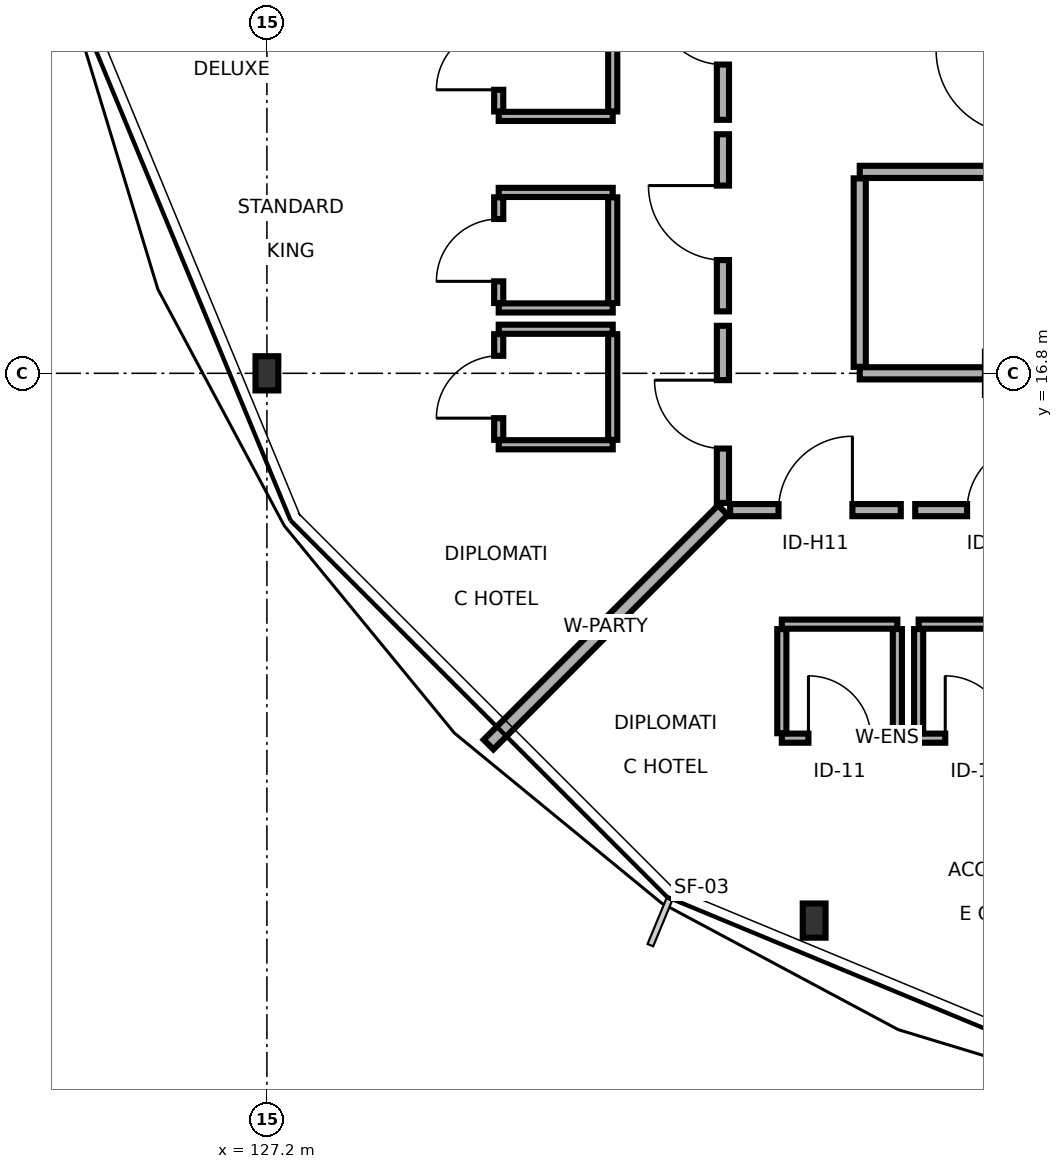
"""IFC4 building model, lengths in metres.
Left out: names, types, materials, properties, quantities, classifications, styles, units other than length and angle.
Written with IfcOpenShell. Run it as: python <this file> out.ifc"""

import sys

from ifc_helpers import new_model, si_unit, direction, frame, frame_2d, origin, origin_2d, place, context, subcontext, project, spatial, rectangle, i_section, extrude, element, fill, save


model = new_model("IFC4")
c1 = context("Model", 3, precision=1e-05, world=origin(), true_north=direction((0.0, 1.0)))
c2 = subcontext(c1, "Body", "Model", "MODEL_VIEW")
j1 = project(units=[si_unit("LENGTHUNIT", "METRE"), si_unit("PLANEANGLEUNIT", "RADIAN")], contexts=[c1])
p1 = place(None, origin())
s1 = spatial("IfcSite", under=j1, at=p1, CompositionType="ELEMENT")
p2 = place(p1, origin())
s2 = spatial("IfcBuilding", under=s1, at=p2, CompositionType="ELEMENT")
p3 = place(p2, frame((0.0, 0.0, 31.7)))
s3 = spatial("IfcBuildingStorey", under=s2, at=p3, CompositionType="ELEMENT", Elevation=31.7)
for number, where, z_axis, x_axis in (
    (1, (134.4, 9.6, 0.0), (0.0, 0.0, 1.0), (1.0, 0.0, 0.0)),
    (2, (127.2, 16.8, 0.0), (0.0, 0.0, 1.0), (1.0, 0.0, 0.0)),
):
    element("IfcColumn", number, at=place(p3, frame(where, z_axis=z_axis, x_axis=x_axis)), inside=s3, PredefinedType="COLUMN", context=c2, shape_type="SweptSolid", body=[
        extrude(i_section(OverallWidth=0.3, OverallDepth=0.45, WebThickness=0.014, FlangeThickness=0.026, FilletRadius=0.027, at=origin_2d()), origin(), (0.0, 0.0, 1.0), 3.4),
    ])
p4 = place(p3, frame((135.0, 16.8, 0.0), z_axis=(0.0, 0.0, 1.0), x_axis=(1.0, 0.0, 0.0)))
e3 = element("IfcWall", 3, at=p4, inside=s3, PredefinedType="PARTITIONING", context=c2, shape_type="SweptSolid", body=[
    extrude(rectangle(XDim=5.4, YDim=0.16, at=frame_2d((2.7, 0.0))), origin(), (0.0, 0.0, 1.0), 2.705),
])
p5 = place(p4, frame((3.94, 0.0, 0.0)))
e4 = element("IfcOpeningElement", 4, at=p5, cuts=e3, PredefinedType="OPENING", context=c2, shape_type="SweptSolid", body=[
    extrude(rectangle(XDim=1.3, YDim=2.2, at=frame_2d((0.65, 1.1))), frame((0.0, 0.09, 0.0), z_axis=(0.0, -1.0, 0.0), x_axis=(1.0, 0.0, 0.0)), (0.0, 0.0, 1.0), 0.18),
])
p6 = place(p3, frame((135.0, 16.885, 0.0), z_axis=(0.0, 0.0, 1.0), x_axis=(0.0, 1.0, 0.0)))
e5 = element("IfcWall", 5, at=p6, inside=s3, PredefinedType="PARTITIONING", context=c2, shape_type="SweptSolid", body=[
    extrude(rectangle(XDim=2.48, YDim=0.16, at=frame_2d((1.24, 0.0))), origin(), (0.0, 0.0, 1.0), 2.755),
])
p7 = place(p3, frame((135.0, 19.45, 0.0), z_axis=(0.0, 0.0, 1.0), x_axis=(1.0, 0.0, 0.0)))
e6 = element("IfcWall", 6, at=p7, inside=s3, PredefinedType="PARTITIONING", context=c2, shape_type="SweptSolid", body=[
    extrude(rectangle(XDim=2.2, YDim=0.16, at=frame_2d((1.1, 0.0))), origin(), (0.0, 0.0, 1.0), 2.705),
])
p8 = place(p3, frame((133.295, 15.0, 0.0), z_axis=(0.0, 0.0, 1.0), x_axis=(1.0, 0.0, 0.0)))
e7 = element("IfcWall", 7, at=p8, inside=s3, PredefinedType="PARTITIONING", context=c2, shape_type="SweptSolid", body=[
    extrude(rectangle(XDim=2.245, YDim=0.16, at=frame_2d((1.123, 0.0))), origin(), (0.0, 0.0, 1.0), 3.17),
])
p9 = place(p8, frame((0.636, 0.0, 0.0)))
e8 = element("IfcOpeningElement", 8, at=p9, cuts=e7, PredefinedType="OPENING", context=c2, shape_type="SweptSolid", body=[
    extrude(rectangle(XDim=0.972, YDim=2.16, at=frame_2d((0.486, 1.08))), frame((0.0, 0.09, 0.0), z_axis=(0.0, -1.0, 0.0), x_axis=(1.0, 0.0, 0.0)), (0.0, 0.0, 1.0), 0.18),
])
p10 = place(p3, frame((133.975, 12.0, 0.0), z_axis=(0.0, 0.0, 1.0), x_axis=(1.0, 0.0, 0.0)))
e9 = element("IfcWall", 9, at=p10, inside=s3, PredefinedType="PARTITIONING", context=c2, shape_type="SweptSolid", body=[
    extrude(rectangle(XDim=1.52, YDim=0.12, at=frame_2d((0.76, 0.0))), origin(), (0.0, 0.0, 1.0), 2.755),
])
p11 = place(p10, frame((0.35, 0.0, 0.0)))
e10 = element("IfcOpeningElement", 10, at=p11, cuts=e9, PredefinedType="OPENING", context=c2, shape_type="SweptSolid", body=[
    extrude(rectangle(XDim=0.82, YDim=2.08, at=frame_2d((0.41, 1.04))), frame((0.0, 0.07, 0.0), z_axis=(0.0, -1.0, 0.0), x_axis=(1.0, 0.0, 0.0)), (0.0, 0.0, 1.0), 0.14),
])
p12 = place(p3, frame((133.975, 13.5, 0.0), z_axis=(0.0, 0.0, 1.0), x_axis=(1.0, 0.0, 0.0)))
e11 = element("IfcWall", 11, at=p12, inside=s3, PredefinedType="PARTITIONING", context=c2, shape_type="SweptSolid", body=[
    extrude(rectangle(XDim=1.52, YDim=0.12, at=frame_2d((0.76, 0.0))), origin(), (0.0, 0.0, 1.0), 3.17),
])
p13 = place(p3, frame((133.975, 12.065, 0.0), z_axis=(0.0, 0.0, 1.0), x_axis=(0.0, 1.0, 0.0)))
e12 = element("IfcWall", 12, at=p13, inside=s3, PredefinedType="PARTITIONING", context=c2, shape_type="SweptSolid", body=[
    extrude(rectangle(XDim=1.37, YDim=0.12, at=frame_2d((0.685, 0.0))), origin(), (0.0, 0.0, 1.0), 3.17),
])
p14 = place(p3, frame((135.495, 12.065, 0.0), z_axis=(0.0, 0.0, 1.0), x_axis=(0.0, 1.0, 0.0)))
e13 = element("IfcWall", 13, at=p14, inside=s3, PredefinedType="PARTITIONING", context=c2, shape_type="SweptSolid", body=[
    extrude(rectangle(XDim=1.37, YDim=0.12, at=frame_2d((0.685, 0.0))), origin(), (0.0, 0.0, 1.0), 2.755),
])
p15 = place(p3, frame((133.2, 15.0, 0.0), z_axis=(0.0, 0.0, 1.0), x_axis=(-0.707078790814, -0.707134770451, 0.0)))
e14 = element("IfcWall", 14, at=p15, inside=s3, PredefinedType="PARTITIONING", context=c2, shape_type="SweptSolid", body=[
    extrude(rectangle(XDim=4.361, YDim=0.18, at=frame_2d((2.181, 0.0))), origin(), (0.0, 0.0, 1.0), 2.655),
])
p16 = place(p3, frame((135.73, 15.0, 0.0), z_axis=(0.0, 0.0, 1.0), x_axis=(1.0, 0.0, 0.0)))
e15 = element("IfcWall", 15, at=p16, inside=s3, PredefinedType="PARTITIONING", context=c2, shape_type="SweptSolid", body=[
    extrude(rectangle(XDim=2.245, YDim=0.16, at=frame_2d((1.123, 0.0))), origin(), (0.0, 0.0, 1.0), 2.755),
])
p17 = place(p16, frame((0.683, 0.0, 0.0)))
e16 = element("IfcOpeningElement", 16, at=p17, cuts=e15, PredefinedType="OPENING", context=c2, shape_type="SweptSolid", body=[
    extrude(rectangle(XDim=0.88, YDim=2.05, at=frame_2d((0.44, 1.025))), frame((0.0, 0.09, 0.0), z_axis=(0.0, -1.0, 0.0), x_axis=(1.0, 0.0, 0.0)), (0.0, 0.0, 1.0), 0.18),
])
p18 = place(p3, frame((135.775, 12.0, 0.0), z_axis=(0.0, 0.0, 1.0), x_axis=(1.0, 0.0, 0.0)))
e17 = element("IfcWall", 17, at=p18, inside=s3, PredefinedType="PARTITIONING", context=c2, shape_type="SweptSolid", body=[
    extrude(rectangle(XDim=1.52, YDim=0.12, at=frame_2d((0.76, 0.0))), origin(), (0.0, 0.0, 1.0), 3.17),
])
p19 = place(p18, frame((0.35, 0.0, 0.0)))
e18 = element("IfcOpeningElement", 18, at=p19, cuts=e17, PredefinedType="OPENING", context=c2, shape_type="SweptSolid", body=[
    extrude(rectangle(XDim=0.82, YDim=2.08, at=frame_2d((0.41, 1.04))), frame((0.0, 0.07, 0.0), z_axis=(0.0, -1.0, 0.0), x_axis=(1.0, 0.0, 0.0)), (0.0, 0.0, 1.0), 0.14),
])
p20 = place(p3, frame((135.775, 13.5, 0.0), z_axis=(0.0, 0.0, 1.0), x_axis=(1.0, 0.0, 0.0)))
e19 = element("IfcWall", 19, at=p20, inside=s3, PredefinedType="PARTITIONING", context=c2, shape_type="SweptSolid", body=[
    extrude(rectangle(XDim=1.52, YDim=0.12, at=frame_2d((0.76, 0.0))), origin(), (0.0, 0.0, 1.0), 2.755),
])
p21 = place(p3, frame((135.775, 12.065, 0.0), z_axis=(0.0, 0.0, 1.0), x_axis=(0.0, 1.0, 0.0)))
e20 = element("IfcWall", 20, at=p21, inside=s3, PredefinedType="PARTITIONING", context=c2, shape_type="SweptSolid", body=[
    extrude(rectangle(XDim=1.37, YDim=0.12, at=frame_2d((0.685, 0.0))), origin(), (0.0, 0.0, 1.0), 2.755),
])
p22 = place(p3, frame((133.2, 20.135, 0.0), z_axis=(0.0, 0.0, 1.0), x_axis=(0.0, 1.0, 0.0)))
e21 = element("IfcWall", 21, at=p22, inside=s3, PredefinedType="PARTITIONING", context=c2, shape_type="SweptSolid", body=[
    extrude(rectangle(XDim=2.33, YDim=0.16, at=frame_2d((1.165, 0.0))), origin(), (0.0, 0.0, 1.0), 3.17),
])
p23 = place(p22, frame((0.727, 0.0, 0.0)))
e22 = element("IfcOpeningElement", 22, at=p23, cuts=e21, PredefinedType="OPENING", context=c2, shape_type="SweptSolid", body=[
    extrude(rectangle(XDim=0.876, YDim=2.16, at=frame_2d((0.438, 1.08))), frame((0.0, 0.09, 0.0), z_axis=(0.0, -1.0, 0.0), x_axis=(1.0, 0.0, 0.0)), (0.0, 0.0, 1.0), 0.18),
])
p24 = place(p3, frame((130.25, 20.18, 0.0), z_axis=(0.0, 0.0, 1.0), x_axis=(1.0, 0.0, 0.0)))
e23 = element("IfcWall", 23, at=p24, inside=s3, PredefinedType="PARTITIONING", context=c2, shape_type="SweptSolid", body=[
    extrude(rectangle(XDim=1.5, YDim=0.12, at=frame_2d((0.75, 0.0))), origin(), (0.0, 0.0, 1.0), 3.17),
])
p25 = place(p3, frame((130.25, 20.245, 0.0), z_axis=(0.0, 0.0, 1.0), x_axis=(0.0, 1.0, 0.0)))
e24 = element("IfcWall", 24, at=p25, inside=s3, PredefinedType="PARTITIONING", context=c2, shape_type="SweptSolid", body=[
    extrude(rectangle(XDim=1.39, YDim=0.12, at=frame_2d((0.695, 0.0))), origin(), (0.0, 0.0, 1.0), 3.17),
])
p26 = place(p25, frame((0.285, 0.0, 0.0)))
e25 = element("IfcOpeningElement", 25, at=p26, cuts=e24, PredefinedType="OPENING", context=c2, shape_type="SweptSolid", body=[
    extrude(rectangle(XDim=0.82, YDim=2.08, at=frame_2d((0.41, 1.04))), frame((0.0, 0.07, 0.0), z_axis=(0.0, -1.0, 0.0), x_axis=(1.0, 0.0, 0.0)), (0.0, 0.0, 1.0), 0.14),
])
p27 = place(p3, frame((131.75, 20.245, 0.0), z_axis=(0.0, 0.0, 1.0), x_axis=(0.0, 1.0, 0.0)))
e26 = element("IfcWall", 26, at=p27, inside=s3, PredefinedType="PARTITIONING", context=c2, shape_type="SweptSolid", body=[
    extrude(rectangle(XDim=1.39, YDim=0.12, at=frame_2d((0.695, 0.0))), origin(), (0.0, 0.0, 1.0), 3.17),
])
p28 = place(p3, frame((133.2, 17.615, 0.0), z_axis=(0.0, 0.0, 1.0), x_axis=(0.0, 1.0, 0.0)))
e27 = element("IfcWall", 27, at=p28, inside=s3, PredefinedType="PARTITIONING", context=c2, shape_type="SweptSolid", body=[
    extrude(rectangle(XDim=2.33, YDim=0.16, at=frame_2d((1.165, 0.0))), origin(), (0.0, 0.0, 1.0), 3.17),
])
p29 = place(p28, frame((0.675, 0.0, 0.0)))
e28 = element("IfcOpeningElement", 28, at=p29, cuts=e27, PredefinedType="OPENING", context=c2, shape_type="SweptSolid", body=[
    extrude(rectangle(XDim=0.98, YDim=2.05, at=frame_2d((0.49, 1.025))), frame((0.0, 0.09, 0.0), z_axis=(0.0, -1.0, 0.0), x_axis=(1.0, 0.0, 0.0)), (0.0, 0.0, 1.0), 0.18),
])
for number, where, z_axis, x_axis in (
    (29, (130.25, 17.66, 0.0), (0.0, 0.0, 1.0), (1.0, 0.0, 0.0)),
    (30, (130.25, 19.18, 0.0), (0.0, 0.0, 1.0), (1.0, 0.0, 0.0)),
):
    element("IfcWall", number, at=place(p3, frame(where, z_axis=z_axis, x_axis=x_axis)), inside=s3, PredefinedType="PARTITIONING", context=c2, shape_type="SweptSolid", body=[
        extrude(rectangle(XDim=1.5, YDim=0.12, at=frame_2d((0.75, 0.0))), origin(), (0.0, 0.0, 1.0), 3.17),
    ])
p30 = place(p3, frame((130.25, 17.725, 0.0), z_axis=(0.0, 0.0, 1.0), x_axis=(0.0, 1.0, 0.0)))
e31 = element("IfcWall", 31, at=p30, inside=s3, PredefinedType="PARTITIONING", context=c2, shape_type="SweptSolid", body=[
    extrude(rectangle(XDim=1.39, YDim=0.12, at=frame_2d((0.695, 0.0))), origin(), (0.0, 0.0, 1.0), 3.17),
])
p31 = place(p30, frame((0.285, 0.0, 0.0)))
e32 = element("IfcOpeningElement", 32, at=p31, cuts=e31, PredefinedType="OPENING", context=c2, shape_type="SweptSolid", body=[
    extrude(rectangle(XDim=0.82, YDim=2.08, at=frame_2d((0.41, 1.04))), frame((0.0, 0.07, 0.0), z_axis=(0.0, -1.0, 0.0), x_axis=(1.0, 0.0, 0.0)), (0.0, 0.0, 1.0), 0.14),
])
p32 = place(p3, frame((131.75, 17.725, 0.0), z_axis=(0.0, 0.0, 1.0), x_axis=(0.0, 1.0, 0.0)))
e33 = element("IfcWall", 33, at=p32, inside=s3, PredefinedType="PARTITIONING", context=c2, shape_type="SweptSolid", body=[
    extrude(rectangle(XDim=1.39, YDim=0.12, at=frame_2d((0.695, 0.0))), origin(), (0.0, 0.0, 1.0), 3.17),
])
p33 = place(p3, frame((133.2, 15.095, 0.0), z_axis=(0.0, 0.0, 1.0), x_axis=(0.0, 1.0, 0.0)))
e34 = element("IfcWall", 34, at=p33, inside=s3, PredefinedType="PARTITIONING", context=c2, shape_type="SweptSolid", body=[
    extrude(rectangle(XDim=2.33, YDim=0.16, at=frame_2d((1.165, 0.0))), origin(), (0.0, 0.0, 1.0), 2.755),
])
p34 = place(p33, frame((0.715, 0.0, 0.0)))
e35 = element("IfcOpeningElement", 35, at=p34, cuts=e34, PredefinedType="OPENING", context=c2, shape_type="SweptSolid", body=[
    extrude(rectangle(XDim=0.9, YDim=2.1, at=frame_2d((0.45, 1.05))), frame((0.0, 0.09, 0.0), z_axis=(0.0, -1.0, 0.0), x_axis=(1.0, 0.0, 0.0)), (0.0, 0.0, 1.0), 0.18),
])
for number, where, z_axis, x_axis in (
    (36, (130.25, 15.86, 0.0), (0.0, 0.0, 1.0), (1.0, 0.0, 0.0)),
    (37, (130.25, 17.38, 0.0), (0.0, 0.0, 1.0), (1.0, 0.0, 0.0)),
):
    element("IfcWall", number, at=place(p3, frame(where, z_axis=z_axis, x_axis=x_axis)), inside=s3, PredefinedType="PARTITIONING", context=c2, shape_type="SweptSolid", body=[
        extrude(rectangle(XDim=1.5, YDim=0.12, at=frame_2d((0.75, 0.0))), origin(), (0.0, 0.0, 1.0), 3.17),
    ])
p35 = place(p3, frame((130.25, 15.925, 0.0), z_axis=(0.0, 0.0, 1.0), x_axis=(0.0, 1.0, 0.0)))
e38 = element("IfcWall", 38, at=p35, inside=s3, PredefinedType="PARTITIONING", context=c2, shape_type="SweptSolid", body=[
    extrude(rectangle(XDim=1.39, YDim=0.12, at=frame_2d((0.695, 0.0))), origin(), (0.0, 0.0, 1.0), 2.755),
])
p36 = place(p35, frame((0.285, 0.0, 0.0)))
e39 = element("IfcOpeningElement", 39, at=p36, cuts=e38, PredefinedType="OPENING", context=c2, shape_type="SweptSolid", body=[
    extrude(rectangle(XDim=0.82, YDim=2.08, at=frame_2d((0.41, 1.04))), frame((0.0, 0.07, 0.0), z_axis=(0.0, -1.0, 0.0), x_axis=(1.0, 0.0, 0.0)), (0.0, 0.0, 1.0), 0.14),
])
p37 = place(p3, frame((131.75, 15.925, 0.0), z_axis=(0.0, 0.0, 1.0), x_axis=(0.0, 1.0, 0.0)))
e40 = element("IfcWall", 40, at=p37, inside=s3, PredefinedType="PARTITIONING", context=c2, shape_type="SweptSolid", body=[
    extrude(rectangle(XDim=1.39, YDim=0.12, at=frame_2d((0.695, 0.0))), origin(), (0.0, 0.0, 1.0), 2.755),
])
p38 = place(p9, origin())
e41 = element("IfcDoor", 41, at=p38, inside=s3, OperationType="SINGLE_SWING_RIGHT", PredefinedType="DOOR", context=c2, shape_type="SweptSolid", body=[
    extrude(rectangle(XDim=0.972, YDim=2.16, at=frame_2d((0.486, 1.08))), frame((0.0, 0.025, 0.0), z_axis=(0.0, -1.0, 0.0), x_axis=(1.0, 0.0, 0.0)), (0.0, 0.0, 1.0), 0.05),
])
fill(e8, e41)
p39 = place(p11, origin())
e42 = element("IfcDoor", 42, at=p39, inside=s3, OperationType="SINGLE_SWING_LEFT", PredefinedType="DOOR", context=c2, shape_type="SweptSolid", body=[
    extrude(rectangle(XDim=0.82, YDim=2.08, at=frame_2d((0.41, 1.04))), frame((0.0, 0.025, 0.0), z_axis=(0.0, -1.0, 0.0), x_axis=(1.0, 0.0, 0.0)), (0.0, 0.0, 1.0), 0.05),
])
fill(e10, e42)
p40 = place(p17, origin())
e43 = element("IfcDoor", 43, at=p40, inside=s3, OperationType="SINGLE_SWING_RIGHT", PredefinedType="DOOR", context=c2, shape_type="SweptSolid", body=[
    extrude(rectangle(XDim=0.88, YDim=2.05, at=frame_2d((0.44, 1.025))), frame((0.0, 0.025, 0.0), z_axis=(0.0, -1.0, 0.0), x_axis=(1.0, 0.0, 0.0)), (0.0, 0.0, 1.0), 0.05),
])
fill(e16, e43)
p41 = place(p19, origin())
e44 = element("IfcDoor", 44, at=p41, inside=s3, OperationType="SINGLE_SWING_LEFT", PredefinedType="DOOR", context=c2, shape_type="SweptSolid", body=[
    extrude(rectangle(XDim=0.82, YDim=2.08, at=frame_2d((0.41, 1.04))), frame((0.0, 0.025, 0.0), z_axis=(0.0, -1.0, 0.0), x_axis=(1.0, 0.0, 0.0)), (0.0, 0.0, 1.0), 0.05),
])
fill(e18, e44)
p42 = place(p23, origin())
e45 = element("IfcDoor", 45, at=p42, inside=s3, OperationType="SINGLE_SWING_RIGHT", PredefinedType="DOOR", context=c2, shape_type="SweptSolid", body=[
    extrude(rectangle(XDim=0.876, YDim=2.16, at=frame_2d((0.438, 1.08))), frame((0.0, 0.025, 0.0), z_axis=(0.0, -1.0, 0.0), x_axis=(1.0, 0.0, 0.0)), (0.0, 0.0, 1.0), 0.05),
])
fill(e22, e45)
p43 = place(p26, origin())
e46 = element("IfcDoor", 46, at=p43, inside=s3, OperationType="SINGLE_SWING_LEFT", PredefinedType="DOOR", context=c2, shape_type="SweptSolid", body=[
    extrude(rectangle(XDim=0.82, YDim=2.08, at=frame_2d((0.41, 1.04))), frame((0.0, 0.025, 0.0), z_axis=(0.0, -1.0, 0.0), x_axis=(1.0, 0.0, 0.0)), (0.0, 0.0, 1.0), 0.05),
])
fill(e25, e46)
p44 = place(p29, origin())
e47 = element("IfcDoor", 47, at=p44, inside=s3, OperationType="SINGLE_SWING_RIGHT", PredefinedType="DOOR", context=c2, shape_type="SweptSolid", body=[
    extrude(rectangle(XDim=0.98, YDim=2.05, at=frame_2d((0.49, 1.025))), frame((0.0, 0.025, 0.0), z_axis=(0.0, -1.0, 0.0), x_axis=(1.0, 0.0, 0.0)), (0.0, 0.0, 1.0), 0.05),
])
fill(e28, e47)
p45 = place(p31, origin())
e48 = element("IfcDoor", 48, at=p45, inside=s3, OperationType="SINGLE_SWING_LEFT", PredefinedType="DOOR", context=c2, shape_type="SweptSolid", body=[
    extrude(rectangle(XDim=0.82, YDim=2.08, at=frame_2d((0.41, 1.04))), frame((0.0, 0.025, 0.0), z_axis=(0.0, -1.0, 0.0), x_axis=(1.0, 0.0, 0.0)), (0.0, 0.0, 1.0), 0.05),
])
fill(e32, e48)
p46 = place(p34, origin())
e49 = element("IfcDoor", 49, at=p46, inside=s3, OperationType="SINGLE_SWING_RIGHT", PredefinedType="DOOR", context=c2, shape_type="SweptSolid", body=[
    extrude(rectangle(XDim=0.9, YDim=2.1, at=frame_2d((0.45, 1.05))), frame((0.0, 0.025, 0.0), z_axis=(0.0, -1.0, 0.0), x_axis=(1.0, 0.0, 0.0)), (0.0, 0.0, 1.0), 0.05),
])
fill(e35, e49)
p47 = place(p36, origin())
e50 = element("IfcDoor", 50, at=p47, inside=s3, OperationType="SINGLE_SWING_LEFT", PredefinedType="DOOR", context=c2, shape_type="SweptSolid", body=[
    extrude(rectangle(XDim=0.82, YDim=2.08, at=frame_2d((0.41, 1.04))), frame((0.0, 0.025, 0.0), z_axis=(0.0, -1.0, 0.0), x_axis=(1.0, 0.0, 0.0)), (0.0, 0.0, 1.0), 0.05),
])
fill(e39, e50)
save(model, sys.argv[1])
